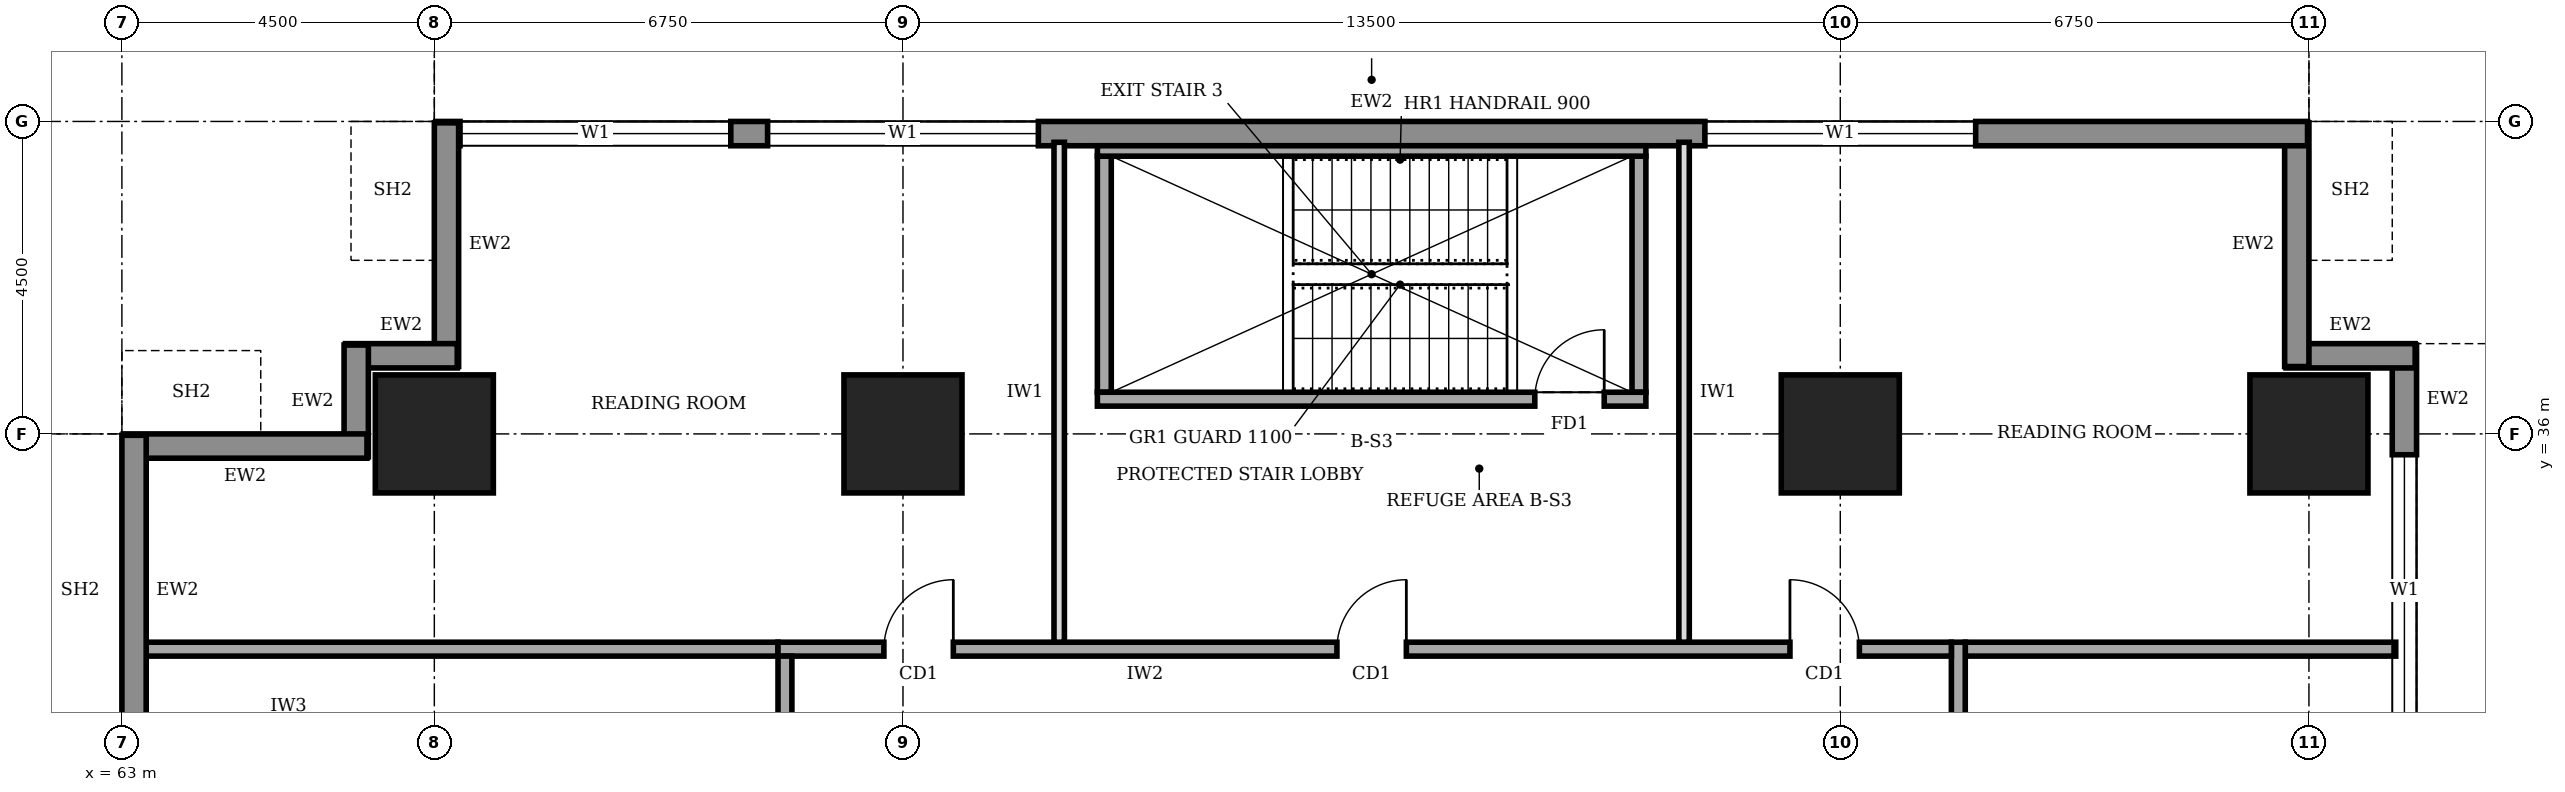
"""IFC4 building model, lengths in metres.
Left out: names, types, materials, properties, quantities, classifications, styles, units other than length and angle.
Written with IfcOpenShell. Run it as: python <this file> out.ifc"""

import sys

from ifc_helpers import new_model, si_unit, direction, frame, frame_2d, origin, origin_2d, place, context, subcontext, project, spatial, rectangle, extrude, element, fill, save


model = new_model("IFC4")
c1 = context("Model", 3, precision=1e-05, world=origin(), true_north=direction((0.0, 1.0)))
c2 = subcontext(c1, "Body", "Model", "MODEL_VIEW")
j1 = project(units=[si_unit("LENGTHUNIT", "METRE"), si_unit("PLANEANGLEUNIT", "RADIAN")], contexts=[c1])
p1 = place(None, origin())
s1 = spatial("IfcSite", under=j1, at=p1, CompositionType="ELEMENT")
p2 = place(p1, origin())
s2 = spatial("IfcBuilding", under=s1, at=p2, CompositionType="ELEMENT")
p3 = place(p2, frame((0.0, 0.0, 109.0)))
s3 = spatial("IfcBuildingStorey", under=s2, at=p3, CompositionType="ELEMENT", Elevation=109.0)
for number, where, z_axis, x_axis in (
    (1, (67.5, 36.0, 0.0), (0.0, 0.0, 1.0), (1.0, 0.0, 0.0)),
    (2, (74.25, 36.0, 0.0), (0.0, 0.0, 1.0), (1.0, 0.0, 0.0)),
    (3, (87.75, 36.0, 0.0), (0.0, 0.0, 1.0), (1.0, 0.0, 0.0)),
    (4, (94.5, 36.0, 0.0), (0.0, 0.0, 1.0), (1.0, 0.0, 0.0)),
):
    element("IfcColumn", number, at=place(p3, frame(where, z_axis=z_axis, x_axis=x_axis)), inside=s3, PredefinedType="COLUMN", context=c2, shape_type="SweptSolid", body=[
        extrude(rectangle(XDim=1.7, YDim=1.7, at=origin_2d()), origin(), (0.0, 0.0, 1.0), 4.0),
    ])
p4 = place(p3, frame((95.875, 3.32, 0.0), z_axis=(0.0, 0.0, 1.0), x_axis=(0.0, 1.0, 0.0)))
e5 = element("IfcWall", 5, at=p4, inside=s3, PredefinedType="STANDARD", context=c2, shape_type="SweptSolid", body=[
    extrude(rectangle(XDim=33.96, YDim=0.35, at=frame_2d((16.98, 0.0))), origin(), (0.0, 0.0, 1.0), 3.75),
])
p5 = place(p4, frame((1.48, 0.0, 0.9)))
e6 = element("IfcOpeningElement", 6, at=p5, cuts=e5, PredefinedType="OPENING", context=c2, shape_type="SweptSolid", body=[
    extrude(rectangle(XDim=3.9, YDim=2.2, at=frame_2d((1.95, 1.1))), frame((0.0, 0.185, 0.0), z_axis=(0.0, -1.0, 0.0), x_axis=(1.0, 0.0, 0.0)), (0.0, 0.0, 1.0), 0.37),
])
p6 = place(p4, frame((5.98, 0.0, 0.9)))
e7 = element("IfcOpeningElement", 7, at=p6, cuts=e5, PredefinedType="OPENING", context=c2, shape_type="SweptSolid", body=[
    extrude(rectangle(XDim=3.9, YDim=2.2, at=frame_2d((1.95, 1.1))), frame((0.0, 0.185, 0.0), z_axis=(0.0, -1.0, 0.0), x_axis=(1.0, 0.0, 0.0)), (0.0, 0.0, 1.0), 0.37),
])
p7 = place(p4, frame((10.48, 0.0, 0.9)))
e8 = element("IfcOpeningElement", 8, at=p7, cuts=e5, PredefinedType="OPENING", context=c2, shape_type="SweptSolid", body=[
    extrude(rectangle(XDim=3.9, YDim=2.2, at=frame_2d((1.95, 1.1))), frame((0.0, 0.185, 0.0), z_axis=(0.0, -1.0, 0.0), x_axis=(1.0, 0.0, 0.0)), (0.0, 0.0, 1.0), 0.37),
])
p8 = place(p4, frame((14.98, 0.0, 0.9)))
e9 = element("IfcOpeningElement", 9, at=p8, cuts=e5, PredefinedType="OPENING", context=c2, shape_type="SweptSolid", body=[
    extrude(rectangle(XDim=3.9, YDim=2.2, at=frame_2d((1.95, 1.1))), frame((0.0, 0.185, 0.0), z_axis=(0.0, -1.0, 0.0), x_axis=(1.0, 0.0, 0.0)), (0.0, 0.0, 1.0), 0.37),
])
p9 = place(p4, frame((19.48, 0.0, 0.9)))
e10 = element("IfcOpeningElement", 10, at=p9, cuts=e5, PredefinedType="OPENING", context=c2, shape_type="SweptSolid", body=[
    extrude(rectangle(XDim=3.9, YDim=2.2, at=frame_2d((1.95, 1.1))), frame((0.0, 0.185, 0.0), z_axis=(0.0, -1.0, 0.0), x_axis=(1.0, 0.0, 0.0)), (0.0, 0.0, 1.0), 0.37),
])
p10 = place(p4, frame((23.98, 0.0, 0.9)))
e11 = element("IfcOpeningElement", 11, at=p10, cuts=e5, PredefinedType="OPENING", context=c2, shape_type="SweptSolid", body=[
    extrude(rectangle(XDim=3.9, YDim=2.2, at=frame_2d((1.95, 1.1))), frame((0.0, 0.185, 0.0), z_axis=(0.0, -1.0, 0.0), x_axis=(1.0, 0.0, 0.0)), (0.0, 0.0, 1.0), 0.37),
])
p11 = place(p4, frame((28.48, 0.0, 0.9)))
e12 = element("IfcOpeningElement", 12, at=p11, cuts=e5, PredefinedType="OPENING", context=c2, shape_type="SweptSolid", body=[
    extrude(rectangle(XDim=3.9, YDim=2.2, at=frame_2d((1.95, 1.1))), frame((0.0, 0.185, 0.0), z_axis=(0.0, -1.0, 0.0), x_axis=(1.0, 0.0, 0.0)), (0.0, 0.0, 1.0), 0.37),
])
p12 = place(p3, frame((96.03, 37.125, 0.0), z_axis=(0.0, 0.0, 1.0), x_axis=(-1.0, 0.0, 0.0)))
e13 = element("IfcWall", 13, at=p12, inside=s3, PredefinedType="STANDARD", context=c2, shape_type="SweptSolid", body=[
    extrude(rectangle(XDim=1.86, YDim=0.35, at=frame_2d((0.93, 0.0))), origin(), (0.0, 0.0, 1.0), 3.75),
])
p13 = place(p3, frame((94.325, 36.97, 0.0), z_axis=(0.0, 0.0, 1.0), x_axis=(0.0, 1.0, 0.0)))
e14 = element("IfcWall", 14, at=p13, inside=s3, PredefinedType="STANDARD", context=c2, shape_type="SweptSolid", body=[
    extrude(rectangle(XDim=3.51, YDim=0.35, at=frame_2d((1.755, 0.0))), origin(), (0.0, 0.0, 1.0), 2.85),
])
p14 = place(p3, frame((94.48, 40.325, 0.0), z_axis=(0.0, 0.0, 1.0), x_axis=(-1.0, 0.0, 0.0)))
e15 = element("IfcWall", 15, at=p14, inside=s3, PredefinedType="STANDARD", context=c2, shape_type="SweptSolid", body=[
    extrude(rectangle(XDim=26.96, YDim=0.35, at=frame_2d((13.48, 0.0))), origin(), (0.0, 0.0, 1.0), 3.75),
])
p15 = place(p14, frame((22.71, 0.0, 0.9)))
e16 = element("IfcOpeningElement", 16, at=p15, cuts=e15, PredefinedType="OPENING", context=c2, shape_type="SweptSolid", body=[
    extrude(rectangle(XDim=3.9, YDim=2.2, at=frame_2d((1.95, 1.1))), frame((0.0, 0.185, 0.0), z_axis=(0.0, -1.0, 0.0), x_axis=(1.0, 0.0, 0.0)), (0.0, 0.0, 1.0), 0.37),
])
p16 = place(p14, frame((18.28, 0.0, 0.9)))
e17 = element("IfcOpeningElement", 17, at=p16, cuts=e15, PredefinedType="OPENING", context=c2, shape_type="SweptSolid", body=[
    extrude(rectangle(XDim=3.9, YDim=2.2, at=frame_2d((1.95, 1.1))), frame((0.0, 0.185, 0.0), z_axis=(0.0, -1.0, 0.0), x_axis=(1.0, 0.0, 0.0)), (0.0, 0.0, 1.0), 0.37),
])
p17 = place(p14, frame((4.78, 0.0, 0.9)))
e18 = element("IfcOpeningElement", 18, at=p17, cuts=e15, PredefinedType="OPENING", context=c2, shape_type="SweptSolid", body=[
    extrude(rectangle(XDim=3.9, YDim=2.2, at=frame_2d((1.95, 1.1))), frame((0.0, 0.185, 0.0), z_axis=(0.0, -1.0, 0.0), x_axis=(1.0, 0.0, 0.0)), (0.0, 0.0, 1.0), 0.37),
])
p18 = place(p3, frame((67.675, 40.48, 0.0), z_axis=(0.0, 0.0, 1.0), x_axis=(0.0, -1.0, 0.0)))
e19 = element("IfcWall", 19, at=p18, inside=s3, PredefinedType="STANDARD", context=c2, shape_type="SweptSolid", body=[
    extrude(rectangle(XDim=3.51, YDim=0.35, at=frame_2d((1.755, 0.0))), origin(), (0.0, 0.0, 1.0), 2.85),
])
for number, where, z_axis, x_axis in (
    (20, (67.83, 37.125, 0.0), (0.0, 0.0, 1.0), (-1.0, 0.0, 0.0)),
    (21, (66.375, 37.28, 0.0), (0.0, 0.0, 1.0), (0.0, -1.0, 0.0)),
):
    element("IfcWall", number, at=place(p3, frame(where, z_axis=z_axis, x_axis=x_axis)), inside=s3, PredefinedType="STANDARD", context=c2, shape_type="SweptSolid", body=[
        extrude(rectangle(XDim=1.61, YDim=0.35, at=frame_2d((0.805, 0.0))), origin(), (0.0, 0.0, 1.0), 3.75),
    ])
p19 = place(p3, frame((66.53, 35.825, 0.0), z_axis=(0.0, 0.0, 1.0), x_axis=(-1.0, 0.0, 0.0)))
e22 = element("IfcWall", 22, at=p19, inside=s3, PredefinedType="STANDARD", context=c2, shape_type="SweptSolid", body=[
    extrude(rectangle(XDim=3.51, YDim=0.35, at=frame_2d((1.755, 0.0))), origin(), (0.0, 0.0, 1.0), 2.85),
])
p20 = place(p3, frame((63.175, 35.98, 0.0), z_axis=(0.0, 0.0, 1.0), x_axis=(0.0, -1.0, 0.0)))
e23 = element("IfcWall", 23, at=p20, inside=s3, PredefinedType="STANDARD", context=c2, shape_type="SweptSolid", body=[
    extrude(rectangle(XDim=4.46, YDim=0.35, at=frame_2d((2.23, 0.0))), origin(), (0.0, 0.0, 1.0), 3.75),
])
p21 = place(p3, frame((89.45, 9.2, 0.0), z_axis=(0.0, 0.0, 1.0), x_axis=(0.0, 1.0, 0.0)))
e24 = element("IfcWall", 24, at=p21, inside=s3, PredefinedType="SOLIDWALL", context=c2, shape_type="SweptSolid", body=[
    extrude(rectangle(XDim=23.8, YDim=0.2, at=frame_2d((11.9, 0.0))), origin(), (0.0, 0.0, 1.0), 3.75),
])
p22 = place(p21, frame((1.625, 0.0, 0.0)))
e25 = element("IfcOpeningElement", 25, at=p22, cuts=e24, PredefinedType="OPENING", context=c2, shape_type="SweptSolid", body=[
    extrude(rectangle(XDim=1.0, YDim=2.1, at=frame_2d((0.5, 1.05))), frame((0.0, 0.11, 0.0), z_axis=(0.0, -1.0, 0.0), x_axis=(1.0, 0.0, 0.0)), (0.0, 0.0, 1.0), 0.22),
])
p23 = place(p21, frame((5.625, 0.0, 0.0)))
e26 = element("IfcOpeningElement", 26, at=p23, cuts=e24, PredefinedType="OPENING", context=c2, shape_type="SweptSolid", body=[
    extrude(rectangle(XDim=0.9, YDim=2.1, at=frame_2d((0.45, 1.05))), frame((0.0, 0.11, 0.0), z_axis=(0.0, -1.0, 0.0), x_axis=(1.0, 0.0, 0.0)), (0.0, 0.0, 1.0), 0.22),
])
p24 = place(p21, frame((10.35, 0.0, 0.0)))
e27 = element("IfcOpeningElement", 27, at=p24, cuts=e24, PredefinedType="OPENING", context=c2, shape_type="SweptSolid", body=[
    extrude(rectangle(XDim=0.9, YDim=2.1, at=frame_2d((0.45, 1.05))), frame((0.0, 0.11, 0.0), z_axis=(0.0, -1.0, 0.0), x_axis=(1.0, 0.0, 0.0)), (0.0, 0.0, 1.0), 0.22),
])
p25 = place(p21, frame((13.325, 0.0, 0.0)))
e28 = element("IfcOpeningElement", 28, at=p25, cuts=e24, PredefinedType="OPENING", context=c2, shape_type="SweptSolid", body=[
    extrude(rectangle(XDim=0.9, YDim=2.1, at=frame_2d((0.45, 1.05))), frame((0.0, 0.11, 0.0), z_axis=(0.0, -1.0, 0.0), x_axis=(1.0, 0.0, 0.0)), (0.0, 0.0, 1.0), 0.22),
])
p26 = place(p21, frame((16.15, 0.0, 0.0)))
e29 = element("IfcOpeningElement", 29, at=p26, cuts=e24, PredefinedType="OPENING", context=c2, shape_type="SweptSolid", body=[
    extrude(rectangle(XDim=1.0, YDim=2.1, at=frame_2d((0.5, 1.05))), frame((0.0, 0.11, 0.0), z_axis=(0.0, -1.0, 0.0), x_axis=(1.0, 0.0, 0.0)), (0.0, 0.0, 1.0), 0.22),
])
p27 = place(p21, frame((8.2, 0.0, 0.0)))
e30 = element("IfcOpeningElement", 30, at=p27, cuts=e24, PredefinedType="OPENING", context=c2, shape_type="SweptSolid", body=[
    extrude(rectangle(XDim=1.0, YDim=2.1, at=frame_2d((0.5, 1.05))), frame((0.0, 0.11, 0.0), z_axis=(0.0, -1.0, 0.0), x_axis=(1.0, 0.0, 0.0)), (0.0, 0.0, 1.0), 0.22),
])
p28 = place(p21, frame((20.225, 0.0, 0.0)))
e31 = element("IfcOpeningElement", 31, at=p28, cuts=e24, PredefinedType="OPENING", context=c2, shape_type="SweptSolid", body=[
    extrude(rectangle(XDim=1.0, YDim=2.1, at=frame_2d((0.5, 1.05))), frame((0.0, 0.11, 0.0), z_axis=(0.0, -1.0, 0.0), x_axis=(1.0, 0.0, 0.0)), (0.0, 0.0, 1.0), 0.22),
])
p29 = place(p3, frame((89.35, 32.9, 0.0), z_axis=(0.0, 0.0, 1.0), x_axis=(-1.0, 0.0, 0.0)))
e32 = element("IfcWall", 32, at=p29, inside=s3, PredefinedType="SOLIDWALL", context=c2, shape_type="SweptSolid", body=[
    extrude(rectangle(XDim=16.9, YDim=0.2, at=frame_2d((8.45, 0.0))), origin(), (0.0, 0.0, 1.0), 3.75),
])
p30 = place(p29, frame((14.375, 0.0, 0.0)))
e33 = element("IfcOpeningElement", 33, at=p30, cuts=e32, PredefinedType="OPENING", context=c2, shape_type="SweptSolid", body=[
    extrude(rectangle(XDim=1.0, YDim=2.1, at=frame_2d((0.5, 1.05))), frame((0.0, 0.11, 0.0), z_axis=(0.0, -1.0, 0.0), x_axis=(1.0, 0.0, 0.0)), (0.0, 0.0, 1.0), 0.22),
])
p31 = place(p29, frame((7.85, 0.0, 0.0)))
e34 = element("IfcOpeningElement", 34, at=p31, cuts=e32, PredefinedType="OPENING", context=c2, shape_type="SweptSolid", body=[
    extrude(rectangle(XDim=1.0, YDim=2.1, at=frame_2d((0.5, 1.05))), frame((0.0, 0.11, 0.0), z_axis=(0.0, -1.0, 0.0), x_axis=(1.0, 0.0, 0.0)), (0.0, 0.0, 1.0), 0.22),
])
p32 = place(p29, frame((1.325, 0.0, 0.0)))
e35 = element("IfcOpeningElement", 35, at=p32, cuts=e32, PredefinedType="OPENING", context=c2, shape_type="SweptSolid", body=[
    extrude(rectangle(XDim=1.0, YDim=2.1, at=frame_2d((0.5, 1.05))), frame((0.0, 0.11, 0.0), z_axis=(0.0, -1.0, 0.0), x_axis=(1.0, 0.0, 0.0)), (0.0, 0.0, 1.0), 0.22),
])
p33 = place(p3, frame((72.55, 32.8, 0.0), z_axis=(0.0, 0.0, 1.0), x_axis=(0.0, -1.0, 0.0)))
e36 = element("IfcWall", 36, at=p33, inside=s3, PredefinedType="SOLIDWALL", context=c2, shape_type="SweptSolid", body=[
    extrude(rectangle(XDim=23.8, YDim=0.2, at=frame_2d((11.9, 0.0))), origin(), (0.0, 0.0, 1.0), 3.75),
])
p34 = place(p33, frame((10.9, 0.0, 0.0)))
e37 = element("IfcOpeningElement", 37, at=p34, cuts=e36, PredefinedType="OPENING", context=c2, shape_type="SweptSolid", body=[
    extrude(rectangle(XDim=1.8, YDim=2.1, at=frame_2d((0.9, 1.05))), frame((0.0, 0.11, 0.0), z_axis=(0.0, -1.0, 0.0), x_axis=(1.0, 0.0, 0.0)), (0.0, 0.0, 1.0), 0.22),
])
p35 = place(p3, frame((63.3, 32.9, 0.0), z_axis=(0.0, 0.0, 1.0), x_axis=(1.0, 0.0, 0.0)))
e38 = element("IfcWall", 38, at=p35, inside=s3, PredefinedType="SOLIDWALL", context=c2, shape_type="SweptSolid", body=[
    extrude(rectangle(XDim=9.15, YDim=0.2, at=frame_2d((4.575, 0.0))), origin(), (0.0, 0.0, 1.0), 3.75),
])
p36 = place(p3, frame((89.55, 32.9, 0.0), z_axis=(0.0, 0.0, 1.0), x_axis=(1.0, 0.0, 0.0)))
e39 = element("IfcWall", 39, at=p36, inside=s3, PredefinedType="SOLIDWALL", context=c2, shape_type="SweptSolid", body=[
    extrude(rectangle(XDim=6.2, YDim=0.2, at=frame_2d((3.1, 0.0))), origin(), (0.0, 0.0, 1.0), 3.75),
])
for number, where, z_axis, x_axis in (
    (40, (76.5, 33.0, 0.0), (0.0, 0.0, 1.0), (0.0, 1.0, 0.0)),
    (41, (85.5, 33.0, 0.0), (0.0, 0.0, 1.0), (0.0, 1.0, 0.0)),
):
    element("IfcWall", number, at=place(p3, frame(where, z_axis=z_axis, x_axis=x_axis)), inside=s3, PredefinedType="PARTITIONING", context=c2, shape_type="SweptSolid", body=[
        extrude(rectangle(XDim=7.2, YDim=0.15, at=frame_2d((3.6, 0.0))), origin(), (0.0, 0.0, 1.0), 3.75),
    ])
p37 = place(p3, frame((77.05, 36.5, 0.0), z_axis=(0.0, 0.0, 1.0), x_axis=(1.0, 0.0, 0.0)))
e42 = element("IfcWall", 42, at=p37, inside=s3, PredefinedType="SOLIDWALL", context=c2, shape_type="SweptSolid", body=[
    extrude(rectangle(XDim=7.9, YDim=0.2, at=frame_2d((3.95, 0.0))), origin(), (0.0, 0.0, 1.0), 3.75),
])
p38 = place(p37, frame((6.3, 0.0, 0.0)))
e43 = element("IfcOpeningElement", 43, at=p38, cuts=e42, PredefinedType="OPENING", context=c2, shape_type="SweptSolid", body=[
    extrude(rectangle(XDim=1.0, YDim=2.1, at=frame_2d((0.5, 1.05))), frame((0.0, 0.11, 0.0), z_axis=(0.0, -1.0, 0.0), x_axis=(1.0, 0.0, 0.0)), (0.0, 0.0, 1.0), 0.22),
])
p39 = place(p3, frame((77.05, 40.075, 0.0), z_axis=(0.0, 0.0, 1.0), x_axis=(1.0, 0.0, 0.0)))
e44 = element("IfcWall", 44, at=p39, inside=s3, PredefinedType="SOLIDWALL", context=c2, shape_type="SweptSolid", body=[
    extrude(rectangle(XDim=7.9, YDim=0.15, at=frame_2d((3.95, 0.0))), origin(), (0.0, 0.0, 1.0), 3.75),
])
for number, where, z_axis, x_axis in (
    (45, (77.15, 36.6, 0.0), (0.0, 0.0, 1.0), (0.0, 1.0, 0.0)),
    (46, (84.85, 36.6, 0.0), (0.0, 0.0, 1.0), (0.0, 1.0, 0.0)),
):
    element("IfcWall", number, at=place(p3, frame(where, z_axis=z_axis, x_axis=x_axis)), inside=s3, PredefinedType="SOLIDWALL", context=c2, shape_type="SweptSolid", body=[
        extrude(rectangle(XDim=3.4, YDim=0.2, at=frame_2d((1.7, 0.0))), origin(), (0.0, 0.0, 1.0), 3.75),
    ])
p40 = place(p11, origin())
e47 = element("IfcWindow", 47, at=p40, inside=s3, PartitioningType="SINGLE_PANEL", PredefinedType="WINDOW", context=c2, shape_type="SweptSolid", body=[
    extrude(rectangle(XDim=3.9, YDim=2.2, at=frame_2d((1.95, 1.1))), frame((0.0, 0.03, 0.0), z_axis=(0.0, -1.0, 0.0), x_axis=(1.0, 0.0, 0.0)), (0.0, 0.0, 1.0), 0.06),
])
fill(e12, e47)
p41 = place(p15, origin())
e48 = element("IfcWindow", 48, at=p41, inside=s3, PartitioningType="SINGLE_PANEL", PredefinedType="WINDOW", context=c2, shape_type="SweptSolid", body=[
    extrude(rectangle(XDim=3.9, YDim=2.2, at=frame_2d((1.95, 1.1))), frame((0.0, 0.03, 0.0), z_axis=(0.0, -1.0, 0.0), x_axis=(1.0, 0.0, 0.0)), (0.0, 0.0, 1.0), 0.06),
])
fill(e16, e48)
p42 = place(p16, origin())
e49 = element("IfcWindow", 49, at=p42, inside=s3, PartitioningType="SINGLE_PANEL", PredefinedType="WINDOW", context=c2, shape_type="SweptSolid", body=[
    extrude(rectangle(XDim=3.9, YDim=2.2, at=frame_2d((1.95, 1.1))), frame((0.0, 0.03, 0.0), z_axis=(0.0, -1.0, 0.0), x_axis=(1.0, 0.0, 0.0)), (0.0, 0.0, 1.0), 0.06),
])
fill(e17, e49)
p43 = place(p17, origin())
e50 = element("IfcWindow", 50, at=p43, inside=s3, PartitioningType="SINGLE_PANEL", PredefinedType="WINDOW", context=c2, shape_type="SweptSolid", body=[
    extrude(rectangle(XDim=3.9, YDim=2.2, at=frame_2d((1.95, 1.1))), frame((0.0, 0.03, 0.0), z_axis=(0.0, -1.0, 0.0), x_axis=(1.0, 0.0, 0.0)), (0.0, 0.0, 1.0), 0.06),
])
fill(e18, e50)
p44 = place(p30, frame((1.0, 0.0, 0.0), z_axis=(0.0, 0.0, 1.0), x_axis=(-1.0, 0.0, 0.0)))
e51 = element("IfcDoor", 51, at=p44, inside=s3, OperationType="SINGLE_SWING_RIGHT", PredefinedType="DOOR", context=c2, shape_type="SweptSolid", body=[
    extrude(rectangle(XDim=1.0, YDim=2.1, at=frame_2d((0.5, 1.05))), frame((0.0, 0.025, 0.0), z_axis=(0.0, -1.0, 0.0), x_axis=(1.0, 0.0, 0.0)), (0.0, 0.0, 1.0), 0.05),
])
fill(e33, e51)
p45 = place(p31, frame((1.0, 0.0, 0.0), z_axis=(0.0, 0.0, 1.0), x_axis=(-1.0, 0.0, 0.0)))
e52 = element("IfcDoor", 52, at=p45, inside=s3, OperationType="SINGLE_SWING_RIGHT", PredefinedType="DOOR", context=c2, shape_type="SweptSolid", body=[
    extrude(rectangle(XDim=1.0, YDim=2.1, at=frame_2d((0.5, 1.05))), frame((0.0, 0.025, 0.0), z_axis=(0.0, -1.0, 0.0), x_axis=(1.0, 0.0, 0.0)), (0.0, 0.0, 1.0), 0.05),
])
fill(e34, e52)
p46 = place(p32, frame((1.0, 0.0, 0.0), z_axis=(0.0, 0.0, 1.0), x_axis=(-1.0, 0.0, 0.0)))
e53 = element("IfcDoor", 53, at=p46, inside=s3, OperationType="SINGLE_SWING_LEFT", PredefinedType="DOOR", context=c2, shape_type="SweptSolid", body=[
    extrude(rectangle(XDim=1.0, YDim=2.1, at=frame_2d((0.5, 1.05))), frame((0.0, 0.025, 0.0), z_axis=(0.0, -1.0, 0.0), x_axis=(1.0, 0.0, 0.0)), (0.0, 0.0, 1.0), 0.05),
])
fill(e35, e53)
p47 = place(p38, origin())
e54 = element("IfcDoor", 54, at=p47, inside=s3, OperationType="SINGLE_SWING_RIGHT", PredefinedType="DOOR", context=c2, shape_type="SweptSolid", body=[
    extrude(rectangle(XDim=1.0, YDim=2.1, at=frame_2d((0.5, 1.05))), frame((0.0, 0.025, 0.0), z_axis=(0.0, -1.0, 0.0), x_axis=(1.0, 0.0, 0.0)), (0.0, 0.0, 1.0), 0.05),
])
fill(e43, e54)
save(model, sys.argv[1])
